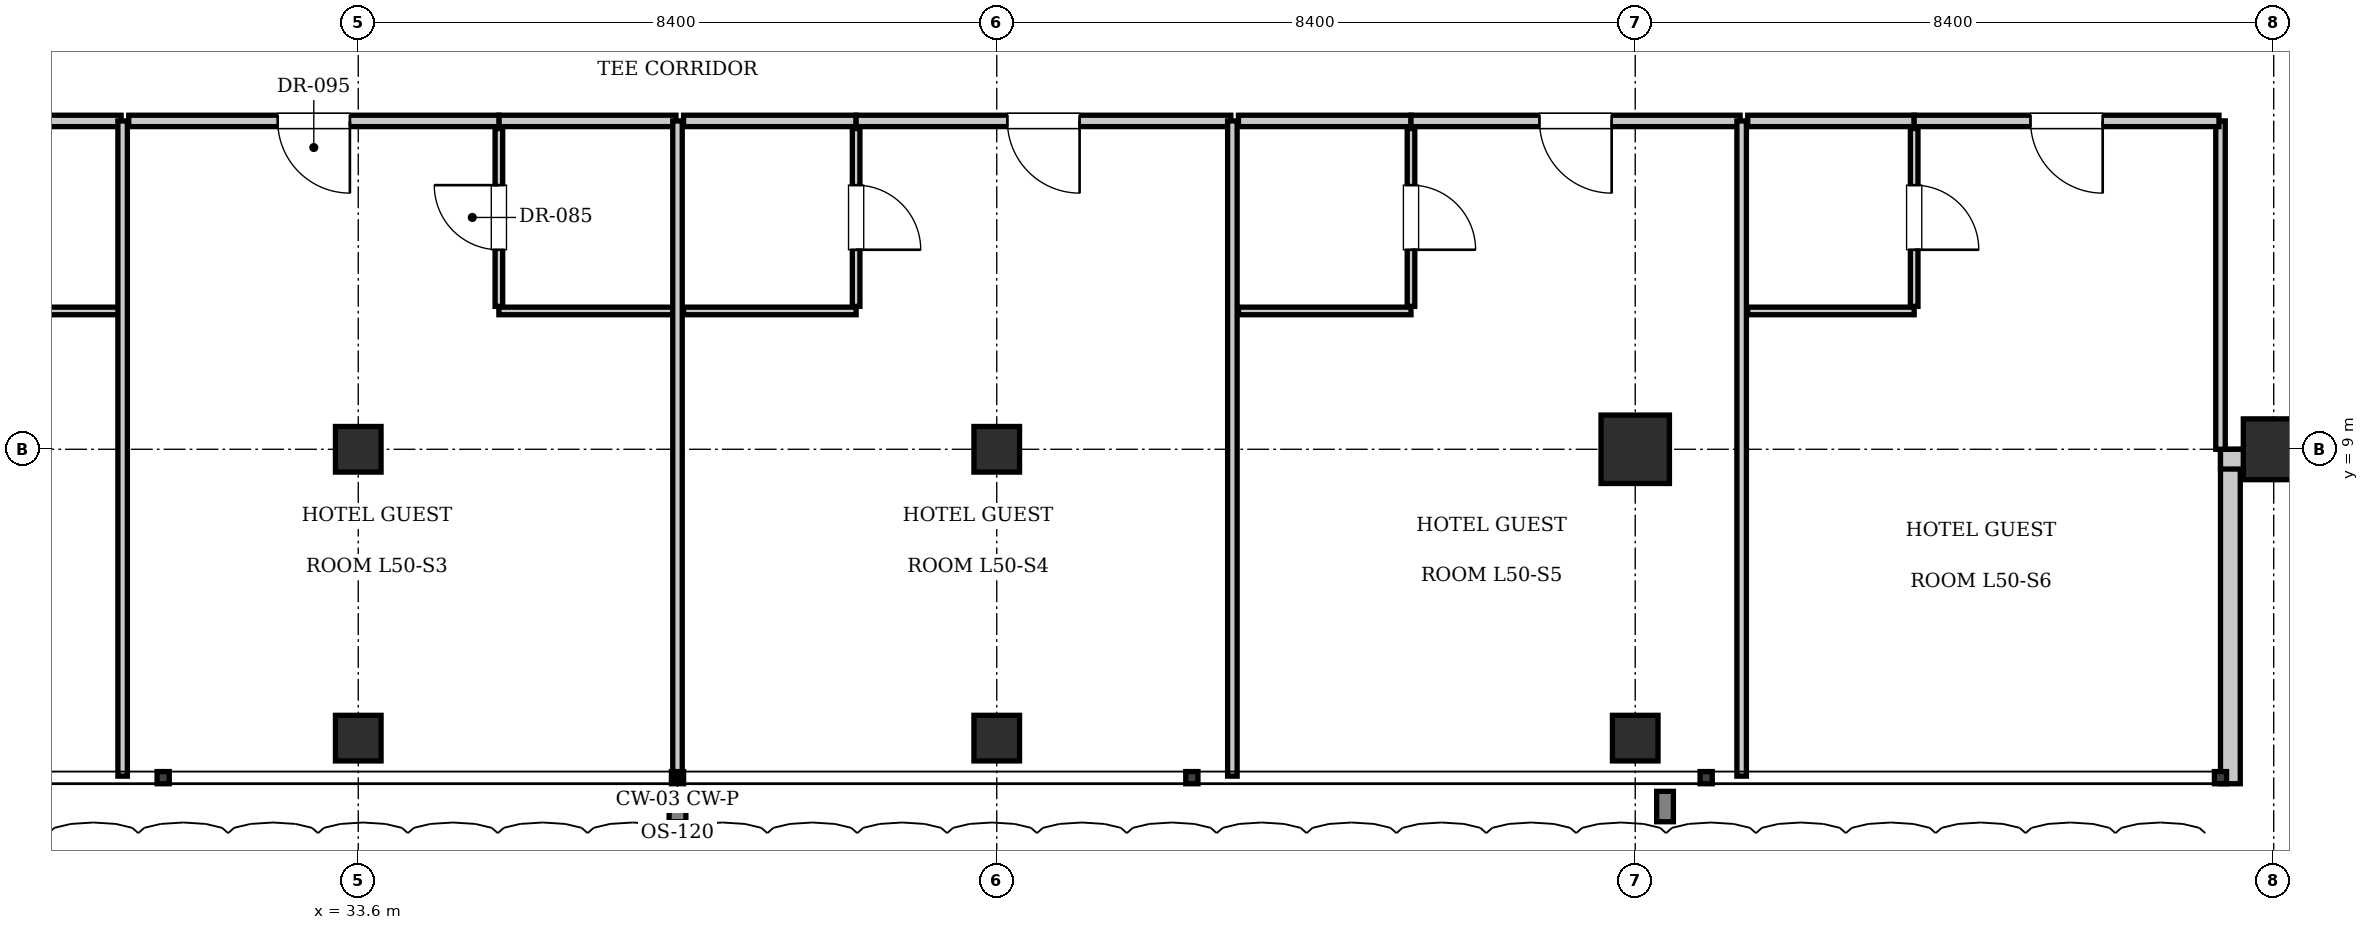
"""IFC4 building model, lengths in metres.
Left out: names, types, materials, properties, quantities, classifications, styles, units other than length and angle.
Written with IfcOpenShell. Run it as: python <this file> out.ifc"""

import sys

from ifc_helpers import new_model, si_unit, direction, frame, frame_2d, origin, origin_2d, place, context, subcontext, project, spatial, rectangle, i_section, extrude, element, fill, save


model = new_model("IFC4")
c1 = context("Model", 3, precision=1e-05, world=origin(), true_north=direction((0.0, 1.0)))
c2 = subcontext(c1, "Body", "Model", "MODEL_VIEW")
j1 = project(units=[si_unit("LENGTHUNIT", "METRE"), si_unit("PLANEANGLEUNIT", "RADIAN")], contexts=[c1])
p1 = place(None, origin())
s1 = spatial("IfcSite", under=j1, at=p1, CompositionType="ELEMENT")
p2 = place(p1, origin())
s2 = spatial("IfcBuilding", under=s1, at=p2, CompositionType="ELEMENT")
p3 = place(p2, frame((0.0, 0.0, 204.4)))
s3 = spatial("IfcBuildingStorey", under=s2, at=p3, CompositionType="ELEMENT", Elevation=204.4)
p4 = place(p3, frame((50.4, 9.0, 0.0), z_axis=(0.0, 0.0, 1.0), x_axis=(1.0, 0.0, 0.0)))
e1 = element("IfcColumn", 1, at=p4, inside=s3, PredefinedType="COLUMN", context=c2, shape_type="SweptSolid", body=[
    extrude(rectangle(XDim=0.9, YDim=0.9, at=origin_2d()), origin(), (0.0, 0.0, 1.0), 3.85),
])
for number, where, z_axis, x_axis in (
    (2, (33.6, 9.0, 0.0), (0.0, 0.0, 1.0), (1.0, 0.0, 0.0)),
    (3, (42.0, 9.0, 0.0), (0.0, 0.0, 1.0), (1.0, 0.0, 0.0)),
):
    element("IfcColumn", number, at=place(p3, frame(where, z_axis=z_axis, x_axis=x_axis)), inside=s3, PredefinedType="COLUMN", context=c2, shape_type="SweptSolid", body=[
        extrude(i_section(OverallWidth=0.6, OverallDepth=0.6, WebThickness=0.025, FlangeThickness=0.038, at=origin_2d()), origin(), (0.0, 0.0, 1.0), 3.85),
    ])
p5 = place(p3, frame((58.8, 9.0, 0.0), z_axis=(0.0, 0.0, 1.0), x_axis=(1.0, 0.0, 0.0)))
e4 = element("IfcColumn", 4, at=p5, inside=s3, PredefinedType="COLUMN", context=c2, shape_type="SweptSolid", body=[
    extrude(rectangle(XDim=0.8, YDim=0.8, at=origin_2d()), origin(), (0.0, 0.0, 1.0), 3.85),
])
for number, where, z_axis, x_axis in (
    (5, (33.6, 5.2, 0.0), (0.0, 0.0, 1.0), (1.0, 0.0, 0.0)),
    (6, (42.0, 5.2, 0.0), (0.0, 0.0, 1.0), (1.0, 0.0, 0.0)),
    (7, (50.4, 5.2, 0.0), (0.0, 0.0, 1.0), (1.0, 0.0, 0.0)),
):
    element("IfcColumn", number, at=place(p3, frame(where, z_axis=z_axis, x_axis=x_axis)), inside=s3, PredefinedType="COLUMN", context=c2, shape_type="SweptSolid", body=[
        extrude(i_section(OverallWidth=0.6, OverallDepth=0.6, WebThickness=0.025, FlangeThickness=0.038, at=origin_2d()), origin(), (0.0, 0.0, 1.0), 3.85),
    ])
p6 = place(p3, frame((58.23, 9.0, 0.0), z_axis=(0.0, 0.0, 1.0), x_axis=(0.0, -1.0, 0.0)))
e8 = element("IfcWall", 8, at=p6, inside=s3, PredefinedType="SOLIDWALL", context=c2, shape_type="SweptSolid", body=[
    extrude(rectangle(XDim=4.4, YDim=0.26, at=frame_2d((2.2, 0.0))), origin(), (0.0, 0.0, 1.0), 3.61),
])
p7 = place(p3, frame((62.5, 8.87, 0.0), z_axis=(0.0, 0.0, 1.0), x_axis=(-1.0, 0.0, 0.0)))
e9 = element("IfcWall", 9, at=p7, inside=s3, PredefinedType="SOLIDWALL", context=c2, shape_type="SweptSolid", body=[
    extrude(rectangle(XDim=4.4, YDim=0.26, at=frame_2d((2.2, 0.0))), origin(), (0.0, 0.0, 1.0), 3.071),
])
p8 = place(p7, frame((1.3, 0.0, 0.9)))
e10 = element("IfcOpeningElement", 10, at=p8, cuts=e9, PredefinedType="OPENING", context=c2, shape_type="SweptSolid", body=[
    extrude(rectangle(XDim=1.8, YDim=2.1, at=frame_2d((0.9, 1.05))), frame((0.0, 0.14, 0.0), z_axis=(0.0, -1.0, 0.0), x_axis=(1.0, 0.0, 0.0)), (0.0, 0.0, 1.0), 0.28),
])
p9 = place(p3, frame((58.1, 9.0, 0.0), z_axis=(0.0, 0.0, 1.0), x_axis=(0.0, 1.0, 0.0)))
e11 = element("IfcWall", 11, at=p9, inside=s3, PredefinedType="PARTITIONING", context=c2, shape_type="SweptSolid", body=[
    extrude(rectangle(XDim=4.32, YDim=0.125, at=frame_2d((2.16, 0.0))), origin(), (0.0, 0.0, 1.0), 3.61),
])
p10 = place(p3, frame((28.15, 13.32, 0.0), z_axis=(0.0, 0.0, 1.0), x_axis=(1.0, 0.0, 0.0)))
e12 = element("IfcWall", 12, at=p10, inside=s3, PredefinedType="PARTITIONING", context=c2, shape_type="SweptSolid", body=[
    extrude(rectangle(XDim=2.33, YDim=0.15, at=frame_2d((1.165, 0.0))), origin(), (0.0, 0.0, 1.0), 3.61),
])
p11 = place(p3, frame((28.15, 10.82, 0.0), z_axis=(0.0, 0.0, 1.0), x_axis=(1.0, 0.0, 0.0)))
e13 = element("IfcWall", 13, at=p11, inside=s3, PredefinedType="PARTITIONING", context=c2, shape_type="SweptSolid", body=[
    extrude(rectangle(XDim=2.31, YDim=0.1, at=frame_2d((1.155, 0.0))), origin(), (0.0, 0.0, 1.0), 3.61),
])
p12 = place(p3, frame((30.5, 4.7, 0.0), z_axis=(0.0, 0.0, 1.0), x_axis=(0.0, 1.0, 0.0)))
e14 = element("IfcWall", 14, at=p12, inside=s3, PredefinedType="PARTITIONING", context=c2, shape_type="SweptSolid", body=[
    extrude(rectangle(XDim=8.62, YDim=0.125, at=frame_2d((4.31, 0.0))), origin(), (0.0, 0.0, 1.0), 3.61),
])
p13 = place(p3, frame((35.45, 13.32, 0.0), z_axis=(0.0, 0.0, 1.0), x_axis=(1.0, 0.0, 0.0)))
e15 = element("IfcWall", 15, at=p13, inside=s3, PredefinedType="PARTITIONING", context=c2, shape_type="SweptSolid", body=[
    extrude(rectangle(XDim=2.33, YDim=0.15, at=frame_2d((1.165, 0.0))), origin(), (0.0, 0.0, 1.0), 3.61),
])
p14 = place(p3, frame((35.45, 10.82, 0.0), z_axis=(0.0, 0.0, 1.0), x_axis=(1.0, 0.0, 0.0)))
e16 = element("IfcWall", 16, at=p14, inside=s3, PredefinedType="PARTITIONING", context=c2, shape_type="SweptSolid", body=[
    extrude(rectangle(XDim=2.31, YDim=0.1, at=frame_2d((1.155, 0.0))), origin(), (0.0, 0.0, 1.0), 3.61),
])
p15 = place(p3, frame((35.45, 10.88, 0.0), z_axis=(0.0, 0.0, 1.0), x_axis=(0.0, 1.0, 0.0)))
e17 = element("IfcWall", 17, at=p15, inside=s3, PredefinedType="PARTITIONING", context=c2, shape_type="SweptSolid", body=[
    extrude(rectangle(XDim=2.34, YDim=0.1, at=frame_2d((1.17, 0.0))), origin(), (0.0, 0.0, 1.0), 3.61),
])
p16 = place(p15, frame((0.745, 0.0, 0.0)))
e18 = element("IfcOpeningElement", 18, at=p16, cuts=e17, PredefinedType="OPENING", context=c2, shape_type="SweptSolid", body=[
    extrude(rectangle(XDim=0.85, YDim=2.1, at=frame_2d((0.425, 1.05))), frame((0.0, 0.06, 0.0), z_axis=(0.0, -1.0, 0.0), x_axis=(1.0, 0.0, 0.0)), (0.0, 0.0, 1.0), 0.12),
])
p17 = place(p3, frame((30.58, 13.32, 0.0), z_axis=(0.0, 0.0, 1.0), x_axis=(1.0, 0.0, 0.0)))
e19 = element("IfcWall", 19, at=p17, inside=s3, PredefinedType="PARTITIONING", context=c2, shape_type="SweptSolid", body=[
    extrude(rectangle(XDim=4.87, YDim=0.15, at=frame_2d((2.435, 0.0))), origin(), (0.0, 0.0, 1.0), 3.61),
])
p18 = place(p17, frame((1.96, 0.0, 0.0)))
e20 = element("IfcOpeningElement", 20, at=p18, cuts=e19, PredefinedType="OPENING", context=c2, shape_type="SweptSolid", body=[
    extrude(rectangle(XDim=0.95, YDim=2.15, at=frame_2d((0.475, 1.075))), frame((0.0, 0.085, 0.0), z_axis=(0.0, -1.0, 0.0), x_axis=(1.0, 0.0, 0.0)), (0.0, 0.0, 1.0), 0.17),
])
p19 = place(p3, frame((37.8, 4.7, 0.0), z_axis=(0.0, 0.0, 1.0), x_axis=(0.0, 1.0, 0.0)))
e21 = element("IfcWall", 21, at=p19, inside=s3, PredefinedType="PARTITIONING", context=c2, shape_type="SweptSolid", body=[
    extrude(rectangle(XDim=8.62, YDim=0.125, at=frame_2d((4.31, 0.0))), origin(), (0.0, 0.0, 1.0), 3.403),
])
p20 = place(p3, frame((37.88, 13.32, 0.0), z_axis=(0.0, 0.0, 1.0), x_axis=(1.0, 0.0, 0.0)))
e22 = element("IfcWall", 22, at=p20, inside=s3, PredefinedType="PARTITIONING", context=c2, shape_type="SweptSolid", body=[
    extrude(rectangle(XDim=2.27, YDim=0.15, at=frame_2d((1.135, 0.0))), origin(), (0.0, 0.0, 1.0), 3.61),
])
p21 = place(p3, frame((37.88, 10.82, 0.0), z_axis=(0.0, 0.0, 1.0), x_axis=(1.0, 0.0, 0.0)))
e23 = element("IfcWall", 23, at=p21, inside=s3, PredefinedType="PARTITIONING", context=c2, shape_type="SweptSolid", body=[
    extrude(rectangle(XDim=2.27, YDim=0.1, at=frame_2d((1.135, 0.0))), origin(), (0.0, 0.0, 1.0), 3.61),
])
p22 = place(p3, frame((40.15, 10.88, 0.0), z_axis=(0.0, 0.0, 1.0), x_axis=(0.0, 1.0, 0.0)))
e24 = element("IfcWall", 24, at=p22, inside=s3, PredefinedType="PARTITIONING", context=c2, shape_type="SweptSolid", body=[
    extrude(rectangle(XDim=2.34, YDim=0.1, at=frame_2d((1.17, 0.0))), origin(), (0.0, 0.0, 1.0), 3.61),
])
p23 = place(p22, frame((0.745, 0.0, 0.0)))
e25 = element("IfcOpeningElement", 25, at=p23, cuts=e24, PredefinedType="OPENING", context=c2, shape_type="SweptSolid", body=[
    extrude(rectangle(XDim=0.85, YDim=2.1, at=frame_2d((0.425, 1.05))), frame((0.0, 0.06, 0.0), z_axis=(0.0, -1.0, 0.0), x_axis=(1.0, 0.0, 0.0)), (0.0, 0.0, 1.0), 0.12),
])
p24 = place(p3, frame((40.15, 13.32, 0.0), z_axis=(0.0, 0.0, 1.0), x_axis=(1.0, 0.0, 0.0)))
e26 = element("IfcWall", 26, at=p24, inside=s3, PredefinedType="PARTITIONING", context=c2, shape_type="SweptSolid", body=[
    extrude(rectangle(XDim=4.93, YDim=0.15, at=frame_2d((2.465, 0.0))), origin(), (0.0, 0.0, 1.0), 3.61),
])
p25 = place(p24, frame((1.99, 0.0, 0.0)))
e27 = element("IfcOpeningElement", 27, at=p25, cuts=e26, PredefinedType="OPENING", context=c2, shape_type="SweptSolid", body=[
    extrude(rectangle(XDim=0.95, YDim=2.15, at=frame_2d((0.475, 1.075))), frame((0.0, 0.085, 0.0), z_axis=(0.0, -1.0, 0.0), x_axis=(1.0, 0.0, 0.0)), (0.0, 0.0, 1.0), 0.17),
])
p26 = place(p3, frame((45.1, 4.7, 0.0), z_axis=(0.0, 0.0, 1.0), x_axis=(0.0, 1.0, 0.0)))
e28 = element("IfcWall", 28, at=p26, inside=s3, PredefinedType="PARTITIONING", context=c2, shape_type="SweptSolid", body=[
    extrude(rectangle(XDim=8.62, YDim=0.125, at=frame_2d((4.31, 0.0))), origin(), (0.0, 0.0, 1.0), 3.61),
])
p27 = place(p3, frame((45.18, 13.32, 0.0), z_axis=(0.0, 0.0, 1.0), x_axis=(1.0, 0.0, 0.0)))
e29 = element("IfcWall", 29, at=p27, inside=s3, PredefinedType="PARTITIONING", context=c2, shape_type="SweptSolid", body=[
    extrude(rectangle(XDim=2.27, YDim=0.15, at=frame_2d((1.135, 0.0))), origin(), (0.0, 0.0, 1.0), 3.61),
])
p28 = place(p3, frame((45.18, 10.82, 0.0), z_axis=(0.0, 0.0, 1.0), x_axis=(1.0, 0.0, 0.0)))
e30 = element("IfcWall", 30, at=p28, inside=s3, PredefinedType="PARTITIONING", context=c2, shape_type="SweptSolid", body=[
    extrude(rectangle(XDim=2.27, YDim=0.1, at=frame_2d((1.135, 0.0))), origin(), (0.0, 0.0, 1.0), 3.61),
])
p29 = place(p3, frame((47.45, 10.88, 0.0), z_axis=(0.0, 0.0, 1.0), x_axis=(0.0, 1.0, 0.0)))
e31 = element("IfcWall", 31, at=p29, inside=s3, PredefinedType="PARTITIONING", context=c2, shape_type="SweptSolid", body=[
    extrude(rectangle(XDim=2.34, YDim=0.1, at=frame_2d((1.17, 0.0))), origin(), (0.0, 0.0, 1.0), 3.61),
])
p30 = place(p29, frame((0.745, 0.0, 0.0)))
e32 = element("IfcOpeningElement", 32, at=p30, cuts=e31, PredefinedType="OPENING", context=c2, shape_type="SweptSolid", body=[
    extrude(rectangle(XDim=0.85, YDim=2.1, at=frame_2d((0.425, 1.05))), frame((0.0, 0.06, 0.0), z_axis=(0.0, -1.0, 0.0), x_axis=(1.0, 0.0, 0.0)), (0.0, 0.0, 1.0), 0.12),
])
p31 = place(p3, frame((47.45, 13.32, 0.0), z_axis=(0.0, 0.0, 1.0), x_axis=(1.0, 0.0, 0.0)))
e33 = element("IfcWall", 33, at=p31, inside=s3, PredefinedType="PARTITIONING", context=c2, shape_type="SweptSolid", body=[
    extrude(rectangle(XDim=4.33, YDim=0.15, at=frame_2d((2.165, 0.0))), origin(), (0.0, 0.0, 1.0), 3.61),
])
p32 = place(p31, frame((1.69, 0.0, 0.0)))
e34 = element("IfcOpeningElement", 34, at=p32, cuts=e33, PredefinedType="OPENING", context=c2, shape_type="SweptSolid", body=[
    extrude(rectangle(XDim=0.95, YDim=2.15, at=frame_2d((0.475, 1.075))), frame((0.0, 0.085, 0.0), z_axis=(0.0, -1.0, 0.0), x_axis=(1.0, 0.0, 0.0)), (0.0, 0.0, 1.0), 0.17),
])
p33 = place(p3, frame((51.8, 4.7, 0.0), z_axis=(0.0, 0.0, 1.0), x_axis=(0.0, 1.0, 0.0)))
e35 = element("IfcWall", 35, at=p33, inside=s3, PredefinedType="PARTITIONING", context=c2, shape_type="SweptSolid", body=[
    extrude(rectangle(XDim=8.62, YDim=0.125, at=frame_2d((4.31, 0.0))), origin(), (0.0, 0.0, 1.0), 3.61),
])
p34 = place(p3, frame((51.88, 13.32, 0.0), z_axis=(0.0, 0.0, 1.0), x_axis=(1.0, 0.0, 0.0)))
e36 = element("IfcWall", 36, at=p34, inside=s3, PredefinedType="PARTITIONING", context=c2, shape_type="SweptSolid", body=[
    extrude(rectangle(XDim=2.19, YDim=0.15, at=frame_2d((1.095, 0.0))), origin(), (0.0, 0.0, 1.0), 3.61),
])
p35 = place(p3, frame((51.88, 10.82, 0.0), z_axis=(0.0, 0.0, 1.0), x_axis=(1.0, 0.0, 0.0)))
e37 = element("IfcWall", 37, at=p35, inside=s3, PredefinedType="PARTITIONING", context=c2, shape_type="SweptSolid", body=[
    extrude(rectangle(XDim=2.19, YDim=0.1, at=frame_2d((1.095, 0.0))), origin(), (0.0, 0.0, 1.0), 3.61),
])
p36 = place(p3, frame((54.07, 10.88, 0.0), z_axis=(0.0, 0.0, 1.0), x_axis=(0.0, 1.0, 0.0)))
e38 = element("IfcWall", 38, at=p36, inside=s3, PredefinedType="PARTITIONING", context=c2, shape_type="SweptSolid", body=[
    extrude(rectangle(XDim=2.34, YDim=0.1, at=frame_2d((1.17, 0.0))), origin(), (0.0, 0.0, 1.0), 3.61),
])
p37 = place(p36, frame((0.745, 0.0, 0.0)))
e39 = element("IfcOpeningElement", 39, at=p37, cuts=e38, PredefinedType="OPENING", context=c2, shape_type="SweptSolid", body=[
    extrude(rectangle(XDim=0.85, YDim=2.1, at=frame_2d((0.425, 1.05))), frame((0.0, 0.06, 0.0), z_axis=(0.0, -1.0, 0.0), x_axis=(1.0, 0.0, 0.0)), (0.0, 0.0, 1.0), 0.12),
])
p38 = place(p3, frame((54.07, 13.32, 0.0), z_axis=(0.0, 0.0, 1.0), x_axis=(1.0, 0.0, 0.0)))
e40 = element("IfcWall", 40, at=p38, inside=s3, PredefinedType="PARTITIONING", context=c2, shape_type="SweptSolid", body=[
    extrude(rectangle(XDim=4.01, YDim=0.15, at=frame_2d((2.005, 0.0))), origin(), (0.0, 0.0, 1.0), 3.61),
])
p39 = place(p38, frame((1.53, 0.0, 0.0)))
e41 = element("IfcOpeningElement", 41, at=p39, cuts=e40, PredefinedType="OPENING", context=c2, shape_type="SweptSolid", body=[
    extrude(rectangle(XDim=0.95, YDim=2.15, at=frame_2d((0.475, 1.075))), frame((0.0, 0.085, 0.0), z_axis=(0.0, -1.0, 0.0), x_axis=(1.0, 0.0, 0.0)), (0.0, 0.0, 1.0), 0.17),
])
p40 = place(p16, origin())
e42 = element("IfcDoor", 42, at=p40, inside=s3, OperationType="SINGLE_SWING_RIGHT", PredefinedType="DOOR", context=c2, shape_type="SweptSolid", body=[
    extrude(rectangle(XDim=0.85, YDim=2.1, at=frame_2d((0.425, 1.05))), frame((0.0, 0.025, 0.0), z_axis=(0.0, -1.0, 0.0), x_axis=(1.0, 0.0, 0.0)), (0.0, 0.0, 1.0), 0.05),
])
fill(e18, e42)
p41 = place(p18, frame((0.95, 0.0, 0.0), z_axis=(0.0, 0.0, 1.0), x_axis=(-1.0, 0.0, 0.0)))
e43 = element("IfcDoor", 43, at=p41, inside=s3, OperationType="SINGLE_SWING_LEFT", PredefinedType="DOOR", context=c2, shape_type="SweptSolid", body=[
    extrude(rectangle(XDim=0.95, YDim=2.15, at=frame_2d((0.475, 1.075))), frame((0.0, 0.025, 0.0), z_axis=(0.0, -1.0, 0.0), x_axis=(1.0, 0.0, 0.0)), (0.0, 0.0, 1.0), 0.05),
])
fill(e20, e43)
p42 = place(p23, frame((0.85, 0.0, 0.0), z_axis=(0.0, 0.0, 1.0), x_axis=(-1.0, 0.0, 0.0)))
e44 = element("IfcDoor", 44, at=p42, inside=s3, OperationType="SINGLE_SWING_RIGHT", PredefinedType="DOOR", context=c2, shape_type="SweptSolid", body=[
    extrude(rectangle(XDim=0.85, YDim=2.1, at=frame_2d((0.425, 1.05))), frame((0.0, 0.025, 0.0), z_axis=(0.0, -1.0, 0.0), x_axis=(1.0, 0.0, 0.0)), (0.0, 0.0, 1.0), 0.05),
])
fill(e25, e44)
p43 = place(p25, frame((0.95, 0.0, 0.0), z_axis=(0.0, 0.0, 1.0), x_axis=(-1.0, 0.0, 0.0)))
e45 = element("IfcDoor", 45, at=p43, inside=s3, OperationType="SINGLE_SWING_LEFT", PredefinedType="DOOR", context=c2, shape_type="SweptSolid", body=[
    extrude(rectangle(XDim=0.95, YDim=2.15, at=frame_2d((0.475, 1.075))), frame((0.0, 0.025, 0.0), z_axis=(0.0, -1.0, 0.0), x_axis=(1.0, 0.0, 0.0)), (0.0, 0.0, 1.0), 0.05),
])
fill(e27, e45)
p44 = place(p30, frame((0.85, 0.0, 0.0), z_axis=(0.0, 0.0, 1.0), x_axis=(-1.0, 0.0, 0.0)))
e46 = element("IfcDoor", 46, at=p44, inside=s3, OperationType="SINGLE_SWING_RIGHT", PredefinedType="DOOR", context=c2, shape_type="SweptSolid", body=[
    extrude(rectangle(XDim=0.85, YDim=2.1, at=frame_2d((0.425, 1.05))), frame((0.0, 0.025, 0.0), z_axis=(0.0, -1.0, 0.0), x_axis=(1.0, 0.0, 0.0)), (0.0, 0.0, 1.0), 0.05),
])
fill(e32, e46)
p45 = place(p32, frame((0.95, 0.0, 0.0), z_axis=(0.0, 0.0, 1.0), x_axis=(-1.0, 0.0, 0.0)))
e47 = element("IfcDoor", 47, at=p45, inside=s3, OperationType="SINGLE_SWING_LEFT", PredefinedType="DOOR", context=c2, shape_type="SweptSolid", body=[
    extrude(rectangle(XDim=0.95, YDim=2.15, at=frame_2d((0.475, 1.075))), frame((0.0, 0.025, 0.0), z_axis=(0.0, -1.0, 0.0), x_axis=(1.0, 0.0, 0.0)), (0.0, 0.0, 1.0), 0.05),
])
fill(e34, e47)
p46 = place(p37, frame((0.85, 0.0, 0.0), z_axis=(0.0, 0.0, 1.0), x_axis=(-1.0, 0.0, 0.0)))
e48 = element("IfcDoor", 48, at=p46, inside=s3, OperationType="SINGLE_SWING_RIGHT", PredefinedType="DOOR", context=c2, shape_type="SweptSolid", body=[
    extrude(rectangle(XDim=0.85, YDim=2.1, at=frame_2d((0.425, 1.05))), frame((0.0, 0.025, 0.0), z_axis=(0.0, -1.0, 0.0), x_axis=(1.0, 0.0, 0.0)), (0.0, 0.0, 1.0), 0.05),
])
fill(e39, e48)
p47 = place(p39, frame((0.95, 0.0, 0.0), z_axis=(0.0, 0.0, 1.0), x_axis=(-1.0, 0.0, 0.0)))
e49 = element("IfcDoor", 49, at=p47, inside=s3, OperationType="SINGLE_SWING_LEFT", PredefinedType="DOOR", context=c2, shape_type="SweptSolid", body=[
    extrude(rectangle(XDim=0.95, YDim=2.15, at=frame_2d((0.475, 1.075))), frame((0.0, 0.025, 0.0), z_axis=(0.0, -1.0, 0.0), x_axis=(1.0, 0.0, 0.0)), (0.0, 0.0, 1.0), 0.05),
])
fill(e41, e49)
save(model, sys.argv[1])
